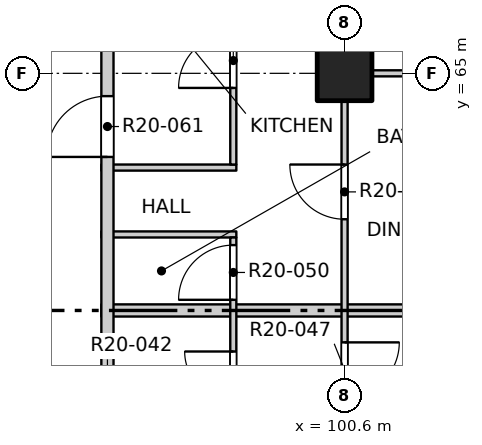
"""IFC4 building model, lengths in metres.
Left out: names, types, materials, properties, quantities, classifications, styles, units other than length and angle.
Written with IfcOpenShell. Run it as: python <this file> out.ifc"""

import sys

from ifc_helpers import new_model, si_unit, direction, frame, frame_2d, origin, origin_2d, place, context, subcontext, project, spatial, rectangle, extrude, element, fill, save


model = new_model("IFC4")
c1 = context("Model", 3, precision=1e-05, world=origin(), true_north=direction((0.0, 1.0)))
c2 = subcontext(c1, "Body", "Model", "MODEL_VIEW")
j1 = project(units=[si_unit("LENGTHUNIT", "METRE"), si_unit("PLANEANGLEUNIT", "RADIAN")], contexts=[c1])
p1 = place(None, origin())
s1 = spatial("IfcSite", under=j1, at=p1, CompositionType="ELEMENT")
p2 = place(p1, origin())
s2 = spatial("IfcBuilding", under=s1, at=p2, CompositionType="ELEMENT")
p3 = place(p2, frame((0.0, 0.0, 210.9)))
s3 = spatial("IfcBuildingStorey", under=s2, at=p3, CompositionType="ELEMENT", Elevation=210.9)
p4 = place(p3, frame((100.6, 65.0, -0.25), z_axis=(0.0, 0.0, 1.0), x_axis=(1.0, 0.0, 0.0)))
e1 = element("IfcColumn", 1, at=p4, inside=s3, PredefinedType="COLUMN", context=c2, shape_type="SweptSolid", body=[
    extrude(rectangle(XDim=0.9, YDim=0.9, at=origin_2d()), origin(), (0.0, 0.0, 1.0), 3.4),
])
p5 = place(p3, frame((96.6, 61.1, 0.0), z_axis=(0.0, 0.0, 1.0), x_axis=(1.0, 0.0, 0.0)))
e2 = element("IfcWall", 2, at=p5, inside=s3, PredefinedType="PARTITIONING", context=c2, shape_type="SweptSolid", body=[
    extrude(rectangle(XDim=11.5, YDim=0.2, at=frame_2d((5.75, 0.0))), origin(), (0.0, 0.0, 1.0), 2.55),
])
for number, where, z_axis, x_axis in (
    (3, (96.6, 62.35, 0.0), (0.0, 0.0, 1.0), (1.0, 0.0, 0.0)),
    (4, (96.6, 63.45, 0.0), (0.0, 0.0, 1.0), (1.0, 0.0, 0.0)),
):
    element("IfcWall", number, at=place(p3, frame(where, z_axis=z_axis, x_axis=x_axis)), inside=s3, PredefinedType="PARTITIONING", context=c2, shape_type="SweptSolid", body=[
        extrude(rectangle(XDim=2.22, YDim=0.1, at=frame_2d((1.11, 0.0))), origin(), (0.0, 0.0, 1.0), 3.15),
    ])
p6 = place(p3, frame((100.55, 65.0, 0.0), z_axis=(0.0, 0.0, 1.0), x_axis=(1.0, 0.0, 0.0)))
e5 = element("IfcWall", 5, at=p6, inside=s3, PredefinedType="PARTITIONING", context=c2, shape_type="SweptSolid", body=[
    extrude(rectangle(XDim=7.55, YDim=0.1, at=frame_2d((3.775, 0.0))), origin(), (0.0, 0.0, 1.0), 3.15),
])
p7 = place(p3, frame((96.7, 49.5, 0.0), z_axis=(0.0, 0.0, 1.0), x_axis=(0.0, 1.0, 0.0)))
e6 = element("IfcWall", 6, at=p7, inside=s3, PredefinedType="PARTITIONING", context=c2, shape_type="SweptSolid", body=[
    extrude(rectangle(XDim=34.9, YDim=0.2, at=frame_2d((17.45, 0.0))), origin(), (0.0, 0.0, 1.0), 3.15),
])
p8 = place(p7, frame((9.625, 0.0, 0.0)))
e7 = element("IfcOpeningElement", 7, at=p8, cuts=e6, PredefinedType="OPENING", context=c2, shape_type="SweptSolid", body=[
    extrude(rectangle(XDim=1.0, YDim=2.1, at=frame_2d((0.5, 1.05))), frame((0.0, 0.11, 0.0), z_axis=(0.0, -1.0, 0.0), x_axis=(1.0, 0.0, 0.0)), (0.0, 0.0, 1.0), 0.22),
])
p9 = place(p7, frame((14.125, 0.0, 0.0)))
e8 = element("IfcOpeningElement", 8, at=p9, cuts=e6, PredefinedType="OPENING", context=c2, shape_type="SweptSolid", body=[
    extrude(rectangle(XDim=1.0, YDim=2.1, at=frame_2d((0.5, 1.05))), frame((0.0, 0.11, 0.0), z_axis=(0.0, -1.0, 0.0), x_axis=(1.0, 0.0, 0.0)), (0.0, 0.0, 1.0), 0.22),
])
p10 = place(p7, frame((29.275, 0.0, 0.0)))
e9 = element("IfcOpeningElement", 9, at=p10, cuts=e6, PredefinedType="OPENING", context=c2, shape_type="SweptSolid", body=[
    extrude(rectangle(XDim=1.0, YDim=2.1, at=frame_2d((0.5, 1.05))), frame((0.0, 0.11, 0.0), z_axis=(0.0, -1.0, 0.0), x_axis=(1.0, 0.0, 0.0)), (0.0, 0.0, 1.0), 0.22),
])
p11 = place(p3, frame((98.77, 59.0, 0.0), z_axis=(0.0, 0.0, 1.0), x_axis=(0.0, 1.0, 0.0)))
e10 = element("IfcWall", 10, at=p11, inside=s3, PredefinedType="PARTITIONING", context=c2, shape_type="SweptSolid", body=[
    extrude(rectangle(XDim=3.3, YDim=0.1, at=frame_2d((1.65, 0.0))), origin(), (0.0, 0.0, 1.0), 3.15),
])
p12 = place(p11, frame((0.625, 0.0, 0.0)))
e11 = element("IfcOpeningElement", 11, at=p12, cuts=e10, PredefinedType="OPENING", context=c2, shape_type="SweptSolid", body=[
    extrude(rectangle(XDim=0.8, YDim=2.1, at=frame_2d((0.4, 1.05))), frame((0.0, 0.06, 0.0), z_axis=(0.0, -1.0, 0.0), x_axis=(1.0, 0.0, 0.0)), (0.0, 0.0, 1.0), 0.12),
])
p13 = place(p11, frame((2.275, 0.0, 0.0)))
e12 = element("IfcOpeningElement", 12, at=p13, cuts=e10, PredefinedType="OPENING", context=c2, shape_type="SweptSolid", body=[
    extrude(rectangle(XDim=0.9, YDim=2.1, at=frame_2d((0.45, 1.05))), frame((0.0, 0.06, 0.0), z_axis=(0.0, -1.0, 0.0), x_axis=(1.0, 0.0, 0.0)), (0.0, 0.0, 1.0), 0.12),
])
p14 = place(p3, frame((98.77, 63.5, 0.0), z_axis=(0.0, 0.0, 1.0), x_axis=(0.0, 1.0, 0.0)))
e13 = element("IfcWall", 13, at=p14, inside=s3, PredefinedType="PARTITIONING", context=c2, shape_type="SweptSolid", body=[
    extrude(rectangle(XDim=13.95, YDim=0.1, at=frame_2d((6.975, 0.0))), origin(), (0.0, 0.0, 1.0), 3.15),
])
p15 = place(p14, frame((1.26, 0.0, 0.0)))
e14 = element("IfcOpeningElement", 14, at=p15, cuts=e13, PredefinedType="OPENING", context=c2, shape_type="SweptSolid", body=[
    extrude(rectangle(XDim=0.9, YDim=2.1, at=frame_2d((0.45, 1.05))), frame((0.0, 0.06, 0.0), z_axis=(0.0, -1.0, 0.0), x_axis=(1.0, 0.0, 0.0)), (0.0, 0.0, 1.0), 0.12),
])
p16 = place(p14, frame((4.535, 0.0, 0.0)))
e15 = element("IfcOpeningElement", 15, at=p16, cuts=e13, PredefinedType="OPENING", context=c2, shape_type="SweptSolid", body=[
    extrude(rectangle(XDim=0.8, YDim=2.1, at=frame_2d((0.4, 1.05))), frame((0.0, 0.06, 0.0), z_axis=(0.0, -1.0, 0.0), x_axis=(1.0, 0.0, 0.0)), (0.0, 0.0, 1.0), 0.12),
])
p17 = place(p14, frame((7.45, 0.0, 0.0)))
e16 = element("IfcOpeningElement", 16, at=p17, cuts=e13, PredefinedType="OPENING", context=c2, shape_type="SweptSolid", body=[
    extrude(rectangle(XDim=0.8, YDim=2.1, at=frame_2d((0.4, 1.05))), frame((0.0, 0.06, 0.0), z_axis=(0.0, -1.0, 0.0), x_axis=(1.0, 0.0, 0.0)), (0.0, 0.0, 1.0), 0.12),
])
p18 = place(p14, frame((10.35, 0.0, 0.0)))
e17 = element("IfcOpeningElement", 17, at=p18, cuts=e13, PredefinedType="OPENING", context=c2, shape_type="SweptSolid", body=[
    extrude(rectangle(XDim=0.8, YDim=2.1, at=frame_2d((0.4, 1.05))), frame((0.0, 0.06, 0.0), z_axis=(0.0, -1.0, 0.0), x_axis=(1.0, 0.0, 0.0)), (0.0, 0.0, 1.0), 0.12),
])
p19 = place(p14, frame((12.65, 0.0, 0.0)))
e18 = element("IfcOpeningElement", 18, at=p19, cuts=e13, PredefinedType="OPENING", context=c2, shape_type="SweptSolid", body=[
    extrude(rectangle(XDim=0.9, YDim=2.1, at=frame_2d((0.45, 1.05))), frame((0.0, 0.06, 0.0), z_axis=(0.0, -1.0, 0.0), x_axis=(1.0, 0.0, 0.0)), (0.0, 0.0, 1.0), 0.12),
])
p20 = place(p3, frame((100.6, 41.9, 0.0), z_axis=(0.0, 0.0, 1.0), x_axis=(0.0, 1.0, 0.0)))
e19 = element("IfcWall", 19, at=p20, inside=s3, PredefinedType="PARTITIONING", context=c2, shape_type="SweptSolid", body=[
    extrude(rectangle(XDim=46.2, YDim=0.1, at=frame_2d((23.1, 0.0))), origin(), (0.0, 0.0, 1.0), 3.15),
])
p21 = place(p20, frame((1.2, 0.0, 0.0)))
e20 = element("IfcOpeningElement", 20, at=p21, cuts=e19, PredefinedType="OPENING", context=c2, shape_type="SweptSolid", body=[
    extrude(rectangle(XDim=0.9, YDim=2.1, at=frame_2d((0.45, 1.05))), frame((0.0, 0.06, 0.0), z_axis=(0.0, -1.0, 0.0), x_axis=(1.0, 0.0, 0.0)), (0.0, 0.0, 1.0), 0.12),
])
p22 = place(p20, frame((6.025, 0.0, 0.0)))
e21 = element("IfcOpeningElement", 21, at=p22, cuts=e19, PredefinedType="OPENING", context=c2, shape_type="SweptSolid", body=[
    extrude(rectangle(XDim=0.9, YDim=2.1, at=frame_2d((0.45, 1.05))), frame((0.0, 0.06, 0.0), z_axis=(0.0, -1.0, 0.0), x_axis=(1.0, 0.0, 0.0)), (0.0, 0.0, 1.0), 0.12),
])
p23 = place(p20, frame((9.0, 0.0, 0.0)))
e22 = element("IfcOpeningElement", 22, at=p23, cuts=e19, PredefinedType="OPENING", context=c2, shape_type="SweptSolid", body=[
    extrude(rectangle(XDim=0.9, YDim=2.1, at=frame_2d((0.45, 1.05))), frame((0.0, 0.06, 0.0), z_axis=(0.0, -1.0, 0.0), x_axis=(1.0, 0.0, 0.0)), (0.0, 0.0, 1.0), 0.12),
])
p24 = place(p20, frame((13.85, 0.0, 0.0)))
e23 = element("IfcOpeningElement", 23, at=p24, cuts=e19, PredefinedType="OPENING", context=c2, shape_type="SweptSolid", body=[
    extrude(rectangle(XDim=0.9, YDim=2.1, at=frame_2d((0.45, 1.05))), frame((0.0, 0.06, 0.0), z_axis=(0.0, -1.0, 0.0), x_axis=(1.0, 0.0, 0.0)), (0.0, 0.0, 1.0), 0.12),
])
p25 = place(p20, frame((17.775, 0.0, 0.0)))
e24 = element("IfcOpeningElement", 24, at=p25, cuts=e19, PredefinedType="OPENING", context=c2, shape_type="SweptSolid", body=[
    extrude(rectangle(XDim=0.9, YDim=2.1, at=frame_2d((0.45, 1.05))), frame((0.0, 0.06, 0.0), z_axis=(0.0, -1.0, 0.0), x_axis=(1.0, 0.0, 0.0)), (0.0, 0.0, 1.0), 0.12),
])
p26 = place(p20, frame((20.7, 0.0, 0.0)))
e25 = element("IfcOpeningElement", 25, at=p26, cuts=e19, PredefinedType="OPENING", context=c2, shape_type="SweptSolid", body=[
    extrude(rectangle(XDim=0.9, YDim=2.1, at=frame_2d((0.45, 1.05))), frame((0.0, 0.06, 0.0), z_axis=(0.0, -1.0, 0.0), x_axis=(1.0, 0.0, 0.0)), (0.0, 0.0, 1.0), 0.12),
])
p27 = place(p20, frame((24.6, 0.0, 0.0)))
e26 = element("IfcOpeningElement", 26, at=p27, cuts=e19, PredefinedType="OPENING", context=c2, shape_type="SweptSolid", body=[
    extrude(rectangle(XDim=0.9, YDim=2.1, at=frame_2d((0.45, 1.05))), frame((0.0, 0.06, 0.0), z_axis=(0.0, -1.0, 0.0), x_axis=(1.0, 0.0, 0.0)), (0.0, 0.0, 1.0), 0.12),
])
p28 = place(p20, frame((29.425, 0.0, 0.0)))
e27 = element("IfcOpeningElement", 27, at=p28, cuts=e19, PredefinedType="OPENING", context=c2, shape_type="SweptSolid", body=[
    extrude(rectangle(XDim=0.9, YDim=2.1, at=frame_2d((0.45, 1.05))), frame((0.0, 0.06, 0.0), z_axis=(0.0, -1.0, 0.0), x_axis=(1.0, 0.0, 0.0)), (0.0, 0.0, 1.0), 0.12),
])
p29 = place(p20, frame((33.375, 0.0, 0.0)))
e28 = element("IfcOpeningElement", 28, at=p29, cuts=e19, PredefinedType="OPENING", context=c2, shape_type="SweptSolid", body=[
    extrude(rectangle(XDim=0.9, YDim=2.1, at=frame_2d((0.45, 1.05))), frame((0.0, 0.06, 0.0), z_axis=(0.0, -1.0, 0.0), x_axis=(1.0, 0.0, 0.0)), (0.0, 0.0, 1.0), 0.12),
])
p30 = place(p20, frame((36.3, 0.0, 0.0)))
e29 = element("IfcOpeningElement", 29, at=p30, cuts=e19, PredefinedType="OPENING", context=c2, shape_type="SweptSolid", body=[
    extrude(rectangle(XDim=0.9, YDim=2.1, at=frame_2d((0.45, 1.05))), frame((0.0, 0.06, 0.0), z_axis=(0.0, -1.0, 0.0), x_axis=(1.0, 0.0, 0.0)), (0.0, 0.0, 1.0), 0.12),
])
p31 = place(p20, frame((41.175, 0.0, 0.0)))
e30 = element("IfcOpeningElement", 30, at=p31, cuts=e19, PredefinedType="OPENING", context=c2, shape_type="SweptSolid", body=[
    extrude(rectangle(XDim=0.9, YDim=2.1, at=frame_2d((0.45, 1.05))), frame((0.0, 0.06, 0.0), z_axis=(0.0, -1.0, 0.0), x_axis=(1.0, 0.0, 0.0)), (0.0, 0.0, 1.0), 0.12),
])
p32 = place(p20, frame((44.1, 0.0, 0.0)))
e31 = element("IfcOpeningElement", 31, at=p32, cuts=e19, PredefinedType="OPENING", context=c2, shape_type="SweptSolid", body=[
    extrude(rectangle(XDim=0.9, YDim=2.1, at=frame_2d((0.45, 1.05))), frame((0.0, 0.06, 0.0), z_axis=(0.0, -1.0, 0.0), x_axis=(1.0, 0.0, 0.0)), (0.0, 0.0, 1.0), 0.12),
])
p33 = place(p12, origin())
e32 = element("IfcDoor", 32, at=p33, inside=s3, OperationType="SINGLE_SWING_RIGHT", PredefinedType="DOOR", context=c2, shape_type="SweptSolid", body=[
    extrude(rectangle(XDim=0.8, YDim=2.1, at=frame_2d((0.4, 1.05))), frame((0.0, 0.025, 0.0), z_axis=(0.0, -1.0, 0.0), x_axis=(1.0, 0.0, 0.0)), (0.0, 0.0, 1.0), 0.05),
])
fill(e11, e32)
p34 = place(p25, origin())
e33 = element("IfcDoor", 33, at=p34, inside=s3, OperationType="SINGLE_SWING_LEFT", PredefinedType="DOOR", context=c2, shape_type="SweptSolid", body=[
    extrude(rectangle(XDim=0.9, YDim=2.1, at=frame_2d((0.45, 1.05))), frame((0.0, 0.025, 0.0), z_axis=(0.0, -1.0, 0.0), x_axis=(1.0, 0.0, 0.0)), (0.0, 0.0, 1.0), 0.05),
])
fill(e24, e33)
p35 = place(p13, origin())
e34 = element("IfcDoor", 34, at=p35, inside=s3, OperationType="SINGLE_SWING_LEFT", PredefinedType="DOOR", context=c2, shape_type="SweptSolid", body=[
    extrude(rectangle(XDim=0.9, YDim=2.1, at=frame_2d((0.45, 1.05))), frame((0.0, 0.025, 0.0), z_axis=(0.0, -1.0, 0.0), x_axis=(1.0, 0.0, 0.0)), (0.0, 0.0, 1.0), 0.05),
])
fill(e12, e34)
p36 = place(p26, origin())
e35 = element("IfcDoor", 35, at=p36, inside=s3, OperationType="SINGLE_SWING_RIGHT", PredefinedType="DOOR", context=c2, shape_type="SweptSolid", body=[
    extrude(rectangle(XDim=0.9, YDim=2.1, at=frame_2d((0.45, 1.05))), frame((0.0, 0.025, 0.0), z_axis=(0.0, -1.0, 0.0), x_axis=(1.0, 0.0, 0.0)), (0.0, 0.0, 1.0), 0.05),
])
fill(e25, e35)
p37 = place(p9, origin())
e36 = element("IfcDoor", 36, at=p37, inside=s3, OperationType="SINGLE_SWING_LEFT", PredefinedType="DOOR", context=c2, shape_type="SweptSolid", body=[
    extrude(rectangle(XDim=1.0, YDim=2.1, at=frame_2d((0.5, 1.05))), frame((0.0, 0.025, 0.0), z_axis=(0.0, -1.0, 0.0), x_axis=(1.0, 0.0, 0.0)), (0.0, 0.0, 1.0), 0.05),
])
fill(e8, e36)
p38 = place(p15, origin())
e37 = element("IfcDoor", 37, at=p38, inside=s3, OperationType="SINGLE_SWING_LEFT", PredefinedType="DOOR", context=c2, shape_type="SweptSolid", body=[
    extrude(rectangle(XDim=0.9, YDim=2.1, at=frame_2d((0.45, 1.05))), frame((0.0, 0.025, 0.0), z_axis=(0.0, -1.0, 0.0), x_axis=(1.0, 0.0, 0.0)), (0.0, 0.0, 1.0), 0.05),
])
fill(e14, e37)
save(model, sys.argv[1])
